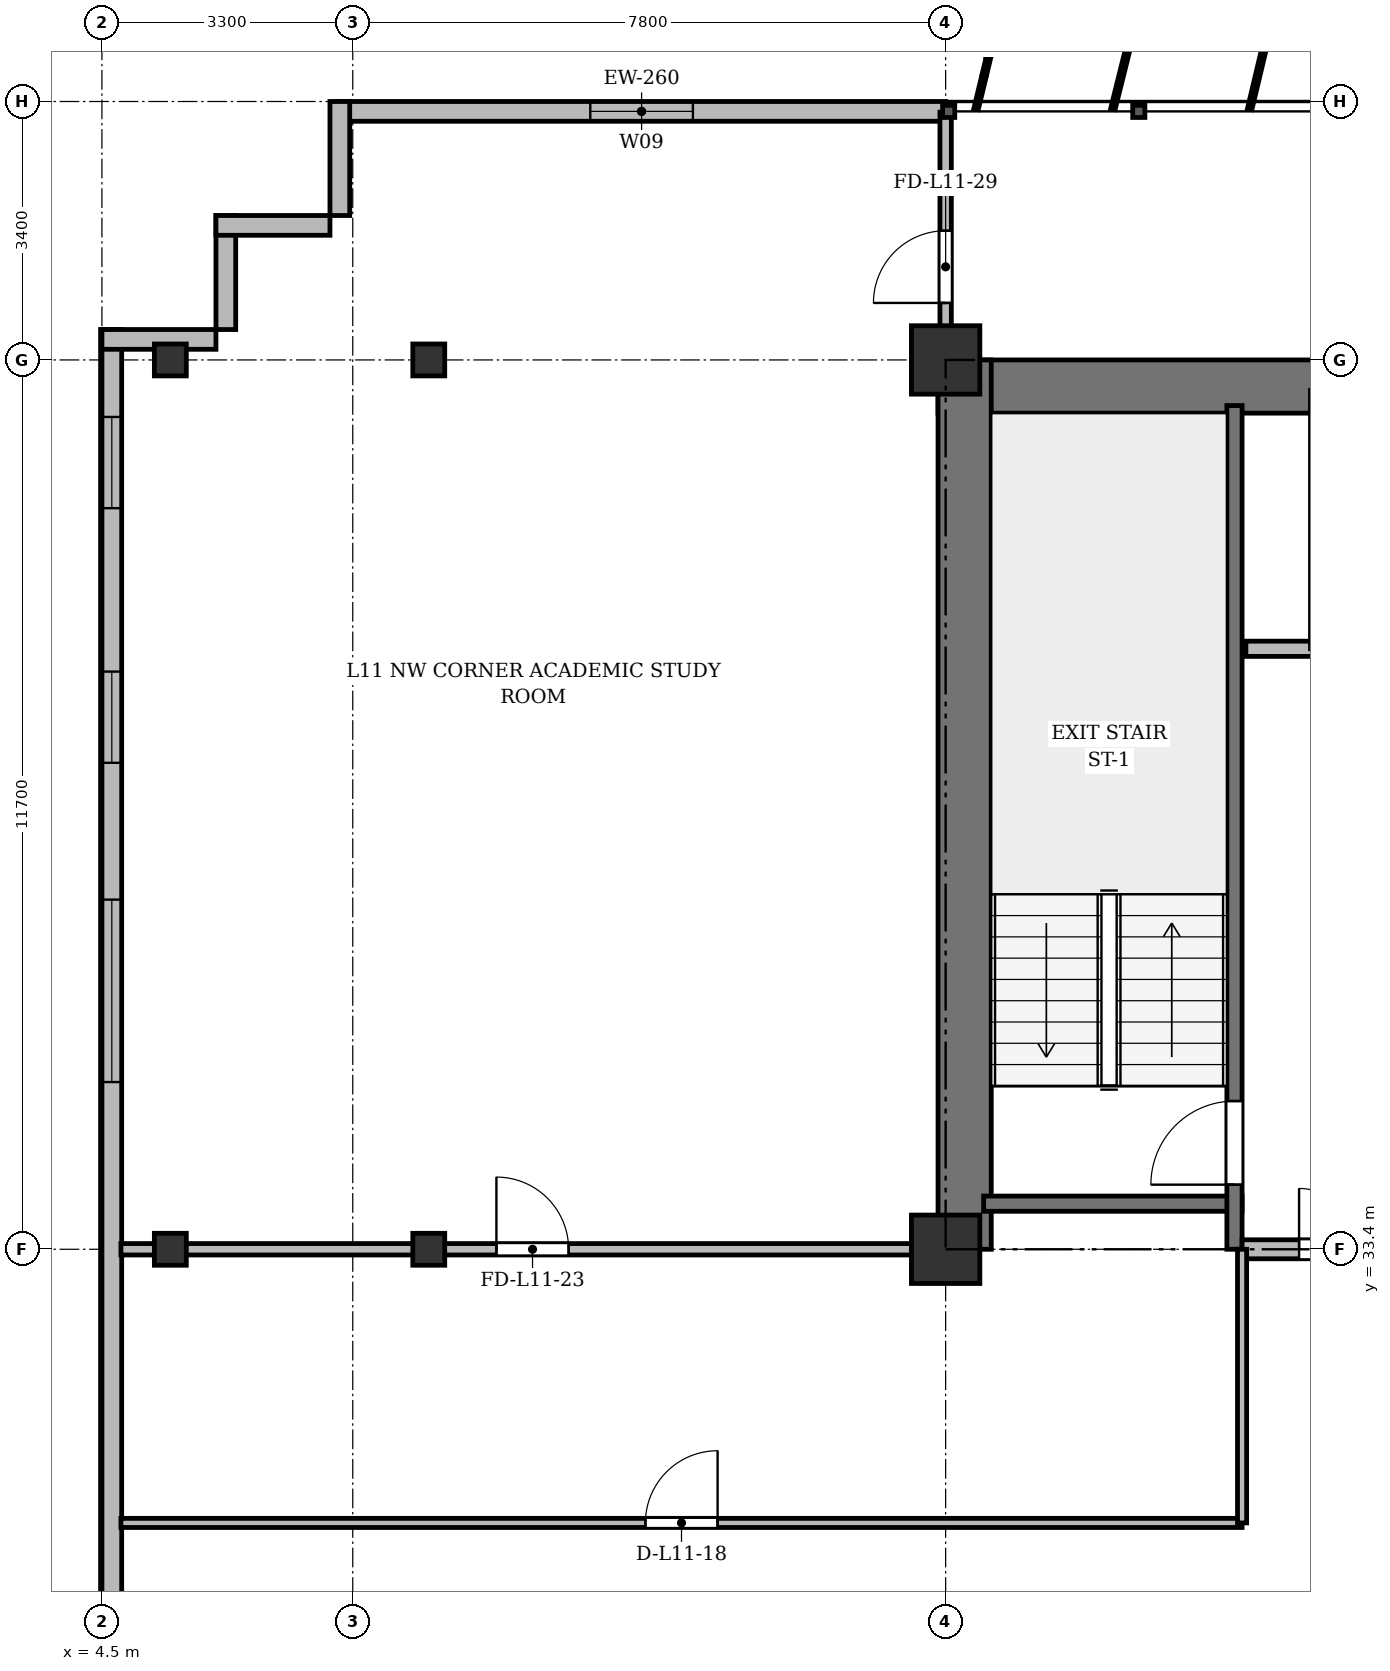
"""IFC4 building model, lengths in metres.
Left out: names, types, materials, properties, quantities, classifications, styles, units other than length and angle.
Written with IfcOpenShell. Run it as: python <this file> out.ifc"""

import sys

from ifc_helpers import new_model, si_unit, direction, frame, frame_2d, origin, origin_2d, place, context, subcontext, project, spatial, rectangle, i_section, extrude, source, transform, mapped, element, fill, save


model = new_model("IFC4")
c1 = context("Model", 3, precision=1e-05, world=origin(), true_north=direction((0.0, 1.0)))
c2 = subcontext(c1, "Body", "Model", "MODEL_VIEW")
j1 = project(units=[si_unit("LENGTHUNIT", "METRE"), si_unit("PLANEANGLEUNIT", "RADIAN")], contexts=[c1])
p1 = place(None, origin())
s1 = spatial("IfcSite", under=j1, at=p1, CompositionType="ELEMENT")
p2 = place(p1, origin())
s2 = spatial("IfcBuilding", under=s1, at=p2, CompositionType="ELEMENT")
p3 = place(p2, frame((0.0, 0.0, 45.1)))
s3 = spatial("IfcBuildingStorey", under=s2, at=p3, CompositionType="ELEMENT", Elevation=45.1)
m1 = source(origin(), c2, "Body", "SweptSolid", [
    extrude(i_section(OverallWidth=0.42, OverallDepth=0.42, WebThickness=0.026, FlangeThickness=0.04, at=origin_2d()), origin(), (0.0, 0.0, 1.0), 3.6),
])
for number, where, z_axis, x_axis in (
    (1, (5.4, 33.4, 0.0), (0.0, 0.0, 1.0), (1.0, 0.0, 0.0)),
    (2, (5.4, 45.1, 0.0), (0.0, 0.0, 1.0), (1.0, 0.0, 0.0)),
    (3, (8.8, 33.4, 0.0), (0.0, 0.0, 1.0), (1.0, 0.0, 0.0)),
    (4, (8.8, 45.1, 0.0), (0.0, 0.0, 1.0), (1.0, 0.0, 0.0)),
):
    element("IfcColumn", number, at=place(p3, frame(where, z_axis=z_axis, x_axis=x_axis)), inside=s3, PredefinedType="COLUMN", context=c2, shape_type="MappedRepresentation", body=[
        mapped(m1, transform((0.0, 0.0, 0.0), x_axis=(1.0, 0.0, 0.0), y_axis=(0.0, 1.0, 0.0), z_axis=(0.0, 0.0, 1.0), scale=1.0)),
    ])
m2 = source(origin(), c2, "Body", "SweptSolid", [
    extrude(rectangle(XDim=0.9, YDim=0.9, at=origin_2d()), origin(), (0.0, 0.0, 1.0), 3.6),
])
for number, where, z_axis, x_axis in (
    (5, (15.6, 33.4, 0.0), (0.0, 0.0, 1.0), (1.0, 0.0, 0.0)),
    (6, (15.6, 45.1, 0.0), (0.0, 0.0, 1.0), (1.0, 0.0, 0.0)),
):
    element("IfcColumn", number, at=place(p3, frame(where, z_axis=z_axis, x_axis=x_axis)), inside=s3, PredefinedType="COLUMN", context=c2, shape_type="MappedRepresentation", body=[
        mapped(m2, transform((0.0, 0.0, 0.0), x_axis=(1.0, 0.0, 0.0), y_axis=(0.0, 1.0, 0.0), z_axis=(0.0, 0.0, 1.0), scale=1.0)),
    ])
p4 = place(p3, frame((7.6, 48.37, 0.0), z_axis=(0.0, 0.0, 1.0), x_axis=(1.0, 0.0, 0.0)))
e7 = element("IfcWall", 7, at=p4, inside=s3, PredefinedType="SOLIDWALL", context=c2, shape_type="SweptSolid", body=[
    extrude(rectangle(XDim=8.0, YDim=0.26, at=frame_2d((4.0, 0.0))), origin(), (0.0, 0.0, 1.0), 3.34),
])
p5 = place(p4, frame((3.325, 0.0, 0.9)))
e8 = element("IfcOpeningElement", 8, at=p5, cuts=e7, PredefinedType="OPENING", context=c2, shape_type="SweptSolid", body=[
    extrude(rectangle(XDim=1.35, YDim=1.5, at=frame_2d((0.675, 0.75))), frame((0.0, 0.14, 0.0), z_axis=(0.0, -1.0, 0.0), x_axis=(1.0, 0.0, 0.0)), (0.0, 0.0, 1.0), 0.28),
])
p6 = place(p3, frame((4.63, 5.9, 0.0), z_axis=(0.0, 0.0, 1.0), x_axis=(0.0, 1.0, 0.0)))
e9 = element("IfcWall", 9, at=p6, inside=s3, PredefinedType="SOLIDWALL", context=c2, shape_type="SweptSolid", body=[
    extrude(rectangle(XDim=39.6, YDim=0.26, at=frame_2d((19.8, 0.0))), origin(), (0.0, 0.0, 1.0), 3.34),
])
p7 = place(p6, frame((1.45, 0.0, 0.92)))
e10 = element("IfcOpeningElement", 10, at=p7, cuts=e9, PredefinedType="OPENING", context=c2, shape_type="SweptSolid", body=[
    extrude(rectangle(XDim=1.2, YDim=1.65, at=frame_2d((0.6, 0.825))), frame((0.0, 0.14, 0.0), z_axis=(0.0, -1.0, 0.0), x_axis=(1.0, 0.0, 0.0)), (0.0, 0.0, 1.0), 0.28),
])
p8 = place(p6, frame((4.3, 0.0, 0.92)))
e11 = element("IfcOpeningElement", 11, at=p8, cuts=e9, PredefinedType="OPENING", context=c2, shape_type="SweptSolid", body=[
    extrude(rectangle(XDim=2.4, YDim=2.1, at=frame_2d((1.2, 1.05))), frame((0.0, 0.14, 0.0), z_axis=(0.0, -1.0, 0.0), x_axis=(1.0, 0.0, 0.0)), (0.0, 0.0, 1.0), 0.28),
])
p9 = place(p6, frame((8.5, 0.0, 0.92)))
e12 = element("IfcOpeningElement", 12, at=p9, cuts=e9, PredefinedType="OPENING", context=c2, shape_type="SweptSolid", body=[
    extrude(rectangle(XDim=2.4, YDim=2.1, at=frame_2d((1.2, 1.05))), frame((0.0, 0.14, 0.0), z_axis=(0.0, -1.0, 0.0), x_axis=(1.0, 0.0, 0.0)), (0.0, 0.0, 1.0), 0.28),
])
p10 = place(p6, frame((29.7, 0.0, 0.92)))
e13 = element("IfcOpeningElement", 13, at=p10, cuts=e9, PredefinedType="OPENING", context=c2, shape_type="SweptSolid", body=[
    extrude(rectangle(XDim=2.4, YDim=2.1, at=frame_2d((1.2, 1.05))), frame((0.0, 0.14, 0.0), z_axis=(0.0, -1.0, 0.0), x_axis=(1.0, 0.0, 0.0)), (0.0, 0.0, 1.0), 0.28),
])
p11 = place(p6, frame((33.9, 0.0, 0.92)))
e14 = element("IfcOpeningElement", 14, at=p11, cuts=e9, PredefinedType="OPENING", context=c2, shape_type="SweptSolid", body=[
    extrude(rectangle(XDim=1.2, YDim=1.65, at=frame_2d((0.6, 0.825))), frame((0.0, 0.14, 0.0), z_axis=(0.0, -1.0, 0.0), x_axis=(1.0, 0.0, 0.0)), (0.0, 0.0, 1.0), 0.28),
])
p12 = place(p6, frame((37.25, 0.0, 0.92)))
e15 = element("IfcOpeningElement", 15, at=p12, cuts=e9, PredefinedType="OPENING", context=c2, shape_type="SweptSolid", body=[
    extrude(rectangle(XDim=1.2, YDim=1.65, at=frame_2d((0.6, 0.825))), frame((0.0, 0.14, 0.0), z_axis=(0.0, -1.0, 0.0), x_axis=(1.0, 0.0, 0.0)), (0.0, 0.0, 1.0), 0.28),
])
p13 = place(p3, frame((4.5, 45.37, 0.0), z_axis=(0.0, 0.0, 1.0), x_axis=(1.0, 0.0, 0.0)))
e16 = element("IfcWall", 16, at=p13, inside=s3, PredefinedType="SOLIDWALL", context=c2, shape_type="SweptSolid", body=[
    extrude(rectangle(XDim=1.5, YDim=0.26, at=frame_2d((0.75, 0.0))), origin(), (0.0, 0.0, 1.0), 2.69),
])
for number, where, z_axis, x_axis in (
    (17, (6.13, 45.5, 0.0), (0.0, 0.0, 1.0), (0.0, 1.0, 0.0)),
    (18, (6.0, 46.87, 0.0), (0.0, 0.0, 1.0), (1.0, 0.0, 0.0)),
    (19, (7.63, 47.0, 0.0), (0.0, 0.0, 1.0), (0.0, 1.0, 0.0)),
):
    element("IfcWall", number, at=place(p3, frame(where, z_axis=z_axis, x_axis=x_axis)), inside=s3, PredefinedType="SOLIDWALL", context=c2, shape_type="SweptSolid", body=[
        extrude(rectangle(XDim=1.5, YDim=0.26, at=frame_2d((0.75, 0.0))), origin(), (0.0, 0.0, 1.0), 3.34),
    ])
p14 = place(p3, frame((15.5, 44.75, 0.0), z_axis=(0.0, 0.0, 1.0), x_axis=(1.0, 0.0, 0.0)))
e20 = element("IfcWall", 20, at=p14, inside=s3, PredefinedType="SHEAR", context=c2, shape_type="SweptSolid", body=[
    extrude(rectangle(XDim=43.4, YDim=0.7, at=frame_2d((21.7, 0.0))), origin(), (0.0, 0.0, 1.0), 3.34),
])
p15 = place(p3, frame((15.85, 33.4, 0.0), z_axis=(0.0, 0.0, 1.0), x_axis=(0.0, 1.0, 0.0)))
e21 = element("IfcWall", 21, at=p15, inside=s3, PredefinedType="SHEAR", context=c2, shape_type="SweptSolid", body=[
    extrude(rectangle(XDim=11.7, YDim=0.7, at=frame_2d((5.85, 0.0))), origin(), (0.0, 0.0, 1.0), 3.34),
])
p16 = place(p3, frame((16.1, 34.0, 0.0), z_axis=(0.0, 0.0, 1.0), x_axis=(1.0, 0.0, 0.0)))
e22 = element("IfcWall", 22, at=p16, inside=s3, PredefinedType="SHEAR", context=c2, shape_type="SweptSolid", body=[
    extrude(rectangle(XDim=3.4, YDim=0.2, at=frame_2d((1.7, 0.0))), origin(), (0.0, 0.0, 1.0), 3.34),
])
p17 = place(p3, frame((19.4, 33.4, 0.0), z_axis=(0.0, 0.0, 1.0), x_axis=(0.0, 1.0, 0.0)))
e23 = element("IfcWall", 23, at=p17, inside=s3, PredefinedType="SHEAR", context=c2, shape_type="SweptSolid", body=[
    extrude(rectangle(XDim=11.1, YDim=0.2, at=frame_2d((5.55, 0.0))), origin(), (0.0, 0.0, 1.0), 3.34),
])
p18 = place(p17, frame((0.85, 0.0, 0.0)))
e24 = element("IfcOpeningElement", 24, at=p18, cuts=e23, PredefinedType="OPENING", context=c2, shape_type="SweptSolid", body=[
    extrude(rectangle(XDim=1.1, YDim=2.15, at=frame_2d((0.55, 1.075))), frame((0.0, 0.11, 0.0), z_axis=(0.0, -1.0, 0.0), x_axis=(1.0, 0.0, 0.0)), (0.0, 0.0, 1.0), 0.22),
])
p19 = place(p3, frame((19.55, 41.3, 0.0), z_axis=(0.0, 0.0, 1.0), x_axis=(1.0, 0.0, 0.0)))
e25 = element("IfcWall", 25, at=p19, inside=s3, PredefinedType="SOLIDWALL", context=c2, shape_type="SweptSolid", body=[
    extrude(rectangle(XDim=6.75, YDim=0.2, at=frame_2d((3.375, 0.0))), origin(), (0.0, 0.0, 1.0), 3.34),
])
p20 = place(p19, frame((1.7, 0.0, 0.0)))
e26 = element("IfcOpeningElement", 26, at=p20, cuts=e25, PredefinedType="OPENING", context=c2, shape_type="SweptSolid", body=[
    extrude(rectangle(XDim=1.1, YDim=2.15, at=frame_2d((0.55, 1.075))), frame((0.0, 0.11, 0.0), z_axis=(0.0, -1.0, 0.0), x_axis=(1.0, 0.0, 0.0)), (0.0, 0.0, 1.0), 0.22),
])
p21 = place(p19, frame((4.4, 0.0, 0.0)))
e27 = element("IfcOpeningElement", 27, at=p21, cuts=e25, PredefinedType="OPENING", context=c2, shape_type="SweptSolid", body=[
    extrude(rectangle(XDim=1.1, YDim=2.15, at=frame_2d((0.55, 1.075))), frame((0.0, 0.11, 0.0), z_axis=(0.0, -1.0, 0.0), x_axis=(1.0, 0.0, 0.0)), (0.0, 0.0, 1.0), 0.22),
])
p22 = place(p3, frame((19.5, 33.4, 0.0), z_axis=(0.0, 0.0, 1.0), x_axis=(1.0, 0.0, 0.0)))
e28 = element("IfcWall", 28, at=p22, inside=s3, PredefinedType="PARTITIONING", context=c2, shape_type="SweptSolid", body=[
    extrude(rectangle(XDim=6.8, YDim=0.25, at=frame_2d((3.4, 0.0))), origin(), (0.0, 0.0, 1.0), 2.69),
])
p23 = place(p22, frame((0.75, 0.0, 0.0)))
e29 = element("IfcOpeningElement", 29, at=p23, cuts=e28, PredefinedType="OPENING", context=c2, shape_type="SweptSolid", body=[
    extrude(rectangle(XDim=1.6, YDim=2.2, at=frame_2d((0.8, 1.1))), frame((0.0, 0.135, 0.0), z_axis=(0.0, -1.0, 0.0), x_axis=(1.0, 0.0, 0.0)), (0.0, 0.0, 1.0), 0.27),
])
p24 = place(p3, frame((4.75, 29.8, 0.0), z_axis=(0.0, 0.0, 1.0), x_axis=(1.0, 0.0, 0.0)))
e30 = element("IfcWall", 30, at=p24, inside=s3, PredefinedType="PARTITIONING", context=c2, shape_type="SweptSolid", body=[
    extrude(rectangle(XDim=14.75, YDim=0.12, at=frame_2d((7.375, 0.0))), origin(), (0.0, 0.0, 1.0), 2.752),
])
p25 = place(p24, frame((6.9, 0.0, 0.0)))
e31 = element("IfcOpeningElement", 31, at=p25, cuts=e30, PredefinedType="OPENING", context=c2, shape_type="SweptSolid", body=[
    extrude(rectangle(XDim=0.95, YDim=2.15, at=frame_2d((0.475, 1.075))), frame((0.0, 0.07, 0.0), z_axis=(0.0, -1.0, 0.0), x_axis=(1.0, 0.0, 0.0)), (0.0, 0.0, 1.0), 0.14),
])
p26 = place(p3, frame((19.5, 29.8, 0.0), z_axis=(0.0, 0.0, 1.0), x_axis=(0.0, 1.0, 0.0)))
e32 = element("IfcWall", 32, at=p26, inside=s3, PredefinedType="PARTITIONING", context=c2, shape_type="SweptSolid", body=[
    extrude(rectangle(XDim=3.6, YDim=0.12, at=frame_2d((1.8, 0.0))), origin(), (0.0, 0.0, 1.0), 2.69),
])
p27 = place(p3, frame((4.75, 33.4, 0.0), z_axis=(0.0, 0.0, 1.0), x_axis=(1.0, 0.0, 0.0)))
e33 = element("IfcWall", 33, at=p27, inside=s3, PredefinedType="PARTITIONING", context=c2, shape_type="SweptSolid", body=[
    extrude(rectangle(XDim=10.85, YDim=0.15, at=frame_2d((5.425, 0.0))), origin(), (0.0, 0.0, 1.0), 2.69),
])
p28 = place(p27, frame((4.94, 0.0, 0.0)))
e34 = element("IfcOpeningElement", 34, at=p28, cuts=e33, PredefinedType="OPENING", context=c2, shape_type="SweptSolid", body=[
    extrude(rectangle(XDim=0.95, YDim=2.15, at=frame_2d((0.475, 1.075))), frame((0.0, 0.085, 0.0), z_axis=(0.0, -1.0, 0.0), x_axis=(1.0, 0.0, 0.0)), (0.0, 0.0, 1.0), 0.17),
])
p29 = place(p3, frame((15.6, 44.75, 0.0), z_axis=(0.0, 0.0, 1.0), x_axis=(0.0, 1.0, 0.0)))
e35 = element("IfcWall", 35, at=p29, inside=s3, PredefinedType="PARTITIONING", context=c2, shape_type="SweptSolid", body=[
    extrude(rectangle(XDim=3.61, YDim=0.15, at=frame_2d((1.805, 0.0))), origin(), (0.0, 0.0, 1.0), 2.752),
])
p30 = place(p29, frame((1.1, 0.0, 0.0)))
e36 = element("IfcOpeningElement", 36, at=p30, cuts=e35, PredefinedType="OPENING", context=c2, shape_type="SweptSolid", body=[
    extrude(rectangle(XDim=0.95, YDim=2.15, at=frame_2d((0.475, 1.075))), frame((0.0, 0.085, 0.0), z_axis=(0.0, -1.0, 0.0), x_axis=(1.0, 0.0, 0.0)), (0.0, 0.0, 1.0), 0.17),
])
m3 = source(origin(), c2, "Body", "SweptSolid", [
    extrude(rectangle(XDim=1.35, YDim=1.5, at=frame_2d((0.675, 0.75))), frame((0.0, 0.03, 0.0), z_axis=(0.0, -1.0, 0.0), x_axis=(1.0, 0.0, 0.0)), (0.0, 0.0, 1.0), 0.06),
])
p31 = place(p5, origin())
e37 = element("IfcWindow", 37, at=p31, inside=s3, PartitioningType="SINGLE_PANEL", PredefinedType="WINDOW", context=c2, shape_type="MappedRepresentation", body=[
    mapped(m3, transform((0.0, 0.0, 0.0), x_axis=(1.0, 0.0, 0.0), y_axis=(0.0, 1.0, 0.0), z_axis=(0.0, 0.0, 1.0), scale=1.0)),
])
fill(e8, e37)
m4 = source(origin(), c2, "Body", "SweptSolid", [
    extrude(rectangle(XDim=2.4, YDim=2.1, at=frame_2d((1.2, 1.05))), frame((0.0, 0.03, 0.0), z_axis=(0.0, -1.0, 0.0), x_axis=(1.0, 0.0, 0.0)), (0.0, 0.0, 1.0), 0.06),
])
p32 = place(p10, origin())
e38 = element("IfcWindow", 38, at=p32, inside=s3, PartitioningType="SINGLE_PANEL", PredefinedType="WINDOW", context=c2, shape_type="MappedRepresentation", body=[
    mapped(m4, transform((0.0, 0.0, 0.0), x_axis=(1.0, 0.0, 0.0), y_axis=(0.0, 1.0, 0.0), z_axis=(0.0, 0.0, 1.0), scale=1.0)),
])
fill(e13, e38)
m5 = source(origin(), c2, "Body", "SweptSolid", [
    extrude(rectangle(XDim=1.2, YDim=1.65, at=frame_2d((0.6, 0.825))), frame((0.0, 0.03, 0.0), z_axis=(0.0, -1.0, 0.0), x_axis=(1.0, 0.0, 0.0)), (0.0, 0.0, 1.0), 0.06),
])
p33 = place(p11, origin())
e39 = element("IfcWindow", 39, at=p33, inside=s3, PartitioningType="SINGLE_PANEL", PredefinedType="WINDOW", context=c2, shape_type="MappedRepresentation", body=[
    mapped(m5, transform((0.0, 0.0, 0.0), x_axis=(1.0, 0.0, 0.0), y_axis=(0.0, 1.0, 0.0), z_axis=(0.0, 0.0, 1.0), scale=1.0)),
])
fill(e14, e39)
p34 = place(p12, origin())
e40 = element("IfcWindow", 40, at=p34, inside=s3, PartitioningType="SINGLE_PANEL", PredefinedType="WINDOW", context=c2, shape_type="MappedRepresentation", body=[
    mapped(m5, transform((0.0, 0.0, 0.0), x_axis=(1.0, 0.0, 0.0), y_axis=(0.0, 1.0, 0.0), z_axis=(0.0, 0.0, 1.0), scale=1.0)),
])
fill(e15, e40)
m6 = source(origin(), c2, "Body", "SweptSolid", [
    extrude(rectangle(XDim=1.1, YDim=2.15, at=frame_2d((0.55, 1.075))), frame((0.0, 0.025, 0.0), z_axis=(0.0, -1.0, 0.0), x_axis=(1.0, 0.0, 0.0)), (0.0, 0.0, 1.0), 0.05),
])
p35 = place(p18, origin())
e41 = element("IfcDoor", 41, at=p35, inside=s3, OperationType="SINGLE_SWING_LEFT", PredefinedType="DOOR", context=c2, shape_type="MappedRepresentation", body=[
    mapped(m6, transform((0.0, 0.0, 0.0), x_axis=(1.0, 0.0, 0.0), y_axis=(0.0, 1.0, 0.0), z_axis=(0.0, 0.0, 1.0), scale=1.0)),
])
fill(e24, e41)
m7 = source(origin(), c2, "Body", "SweptSolid", [
    extrude(rectangle(XDim=1.6, YDim=2.2, at=frame_2d((0.8, 1.1))), frame((0.0, 0.025, 0.0), z_axis=(0.0, -1.0, 0.0), x_axis=(1.0, 0.0, 0.0)), (0.0, 0.0, 1.0), 0.05),
])
p36 = place(p23, origin())
e42 = element("IfcDoor", 42, at=p36, inside=s3, OperationType="DOUBLE_DOOR_SINGLE_SWING", PredefinedType="DOOR", context=c2, shape_type="MappedRepresentation", body=[
    mapped(m7, transform((0.0, 0.0, 0.0), x_axis=(1.0, 0.0, 0.0), y_axis=(0.0, 1.0, 0.0), z_axis=(0.0, 0.0, 1.0), scale=1.0)),
])
fill(e29, e42)
m8 = source(origin(), c2, "Body", "SweptSolid", [
    extrude(rectangle(XDim=0.95, YDim=2.15, at=frame_2d((0.475, 1.075))), frame((0.0, 0.025, 0.0), z_axis=(0.0, -1.0, 0.0), x_axis=(1.0, 0.0, 0.0)), (0.0, 0.0, 1.0), 0.05),
])
p37 = place(p25, origin())
e43 = element("IfcDoor", 43, at=p37, inside=s3, OperationType="SINGLE_SWING_RIGHT", PredefinedType="DOOR", context=c2, shape_type="MappedRepresentation", body=[
    mapped(m8, transform((0.0, 0.0, 0.0), x_axis=(1.0, 0.0, 0.0), y_axis=(0.0, 1.0, 0.0), z_axis=(0.0, 0.0, 1.0), scale=1.0)),
])
fill(e31, e43)
p38 = place(p28, origin())
e44 = element("IfcDoor", 44, at=p38, inside=s3, OperationType="SINGLE_SWING_LEFT", PredefinedType="DOOR", context=c2, shape_type="MappedRepresentation", body=[
    mapped(m8, transform((0.0, 0.0, 0.0), x_axis=(1.0, 0.0, 0.0), y_axis=(0.0, 1.0, 0.0), z_axis=(0.0, 0.0, 1.0), scale=1.0)),
])
fill(e34, e44)
p39 = place(p30, origin())
e45 = element("IfcDoor", 45, at=p39, inside=s3, OperationType="SINGLE_SWING_LEFT", PredefinedType="DOOR", context=c2, shape_type="MappedRepresentation", body=[
    mapped(m8, transform((0.0, 0.0, 0.0), x_axis=(1.0, 0.0, 0.0), y_axis=(0.0, 1.0, 0.0), z_axis=(0.0, 0.0, 1.0), scale=1.0)),
])
fill(e36, e45)
save(model, sys.argv[1])
